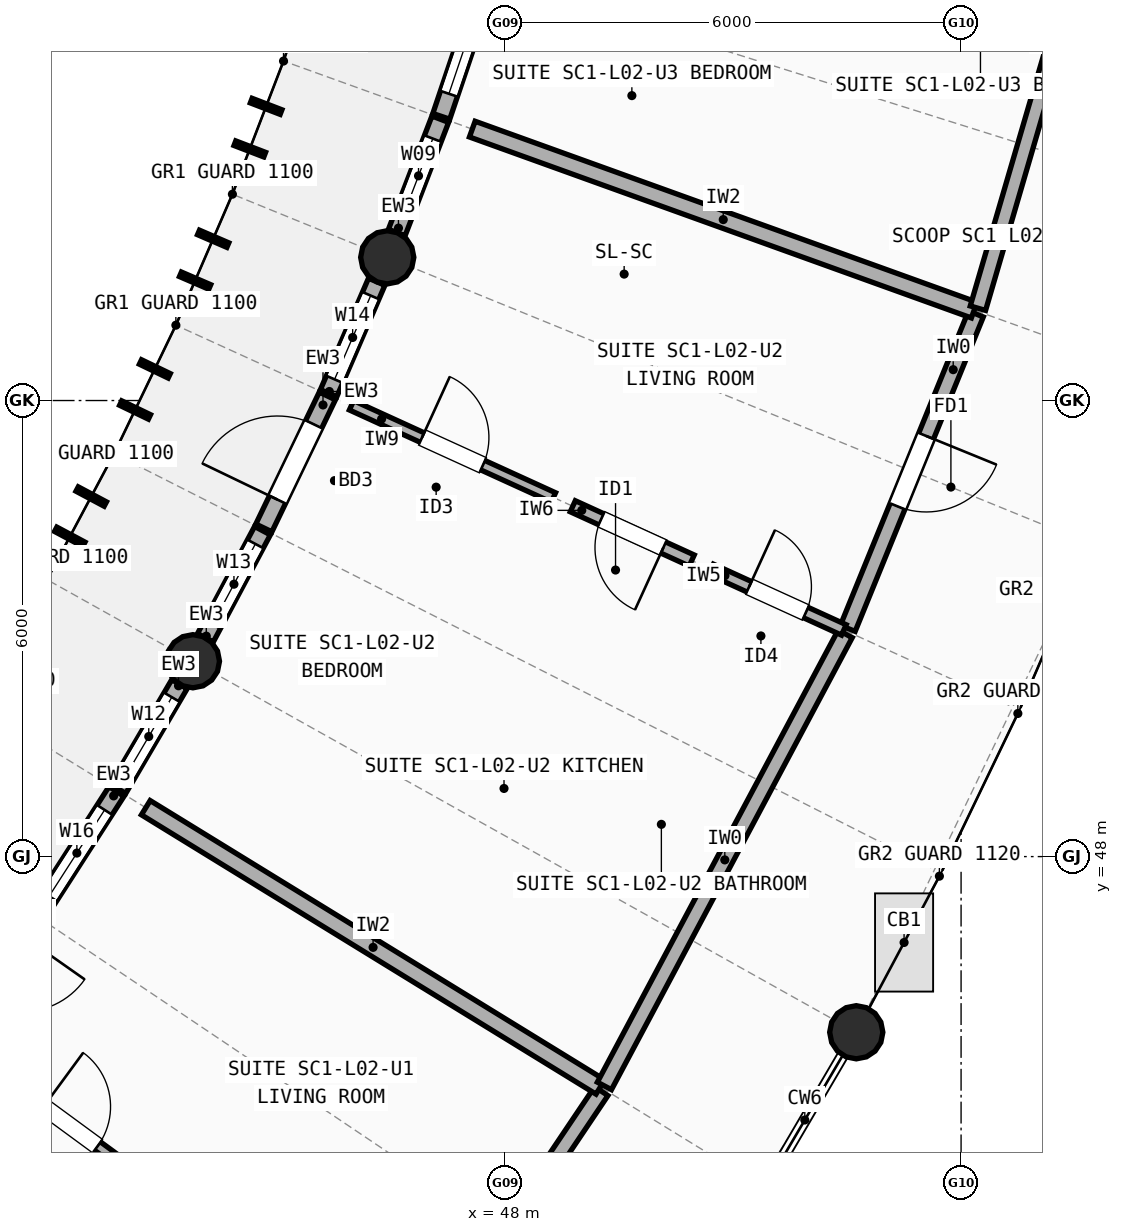
"""IFC4 building model, lengths in metres.
Left out: names, types, materials, properties, quantities, classifications, styles, units other than length and angle.
Written with IfcOpenShell. Run it as: python <this file> out.ifc"""

import sys

from ifc_helpers import new_model, si_unit, direction, frame, frame_2d, origin, origin_2d, place, context, subcontext, project, spatial, rectangle, circle, extrude, element, fill, save


model = new_model("IFC4")
c1 = context("Model", 3, precision=1e-05, world=origin(), true_north=direction((0.0, 1.0)))
c2 = subcontext(c1, "Body", "Model", "MODEL_VIEW")
j1 = project(units=[si_unit("LENGTHUNIT", "METRE"), si_unit("PLANEANGLEUNIT", "RADIAN")], contexts=[c1])
p1 = place(None, origin())
s1 = spatial("IfcSite", under=j1, at=p1, CompositionType="ELEMENT")
p2 = place(p1, origin())
s2 = spatial("IfcBuilding", under=s1, at=p2, CompositionType="ELEMENT")
p3 = place(p2, frame((0.0, 0.0, 7.7)))
s3 = spatial("IfcBuildingStorey", under=s2, at=p3, CompositionType="ELEMENT", Elevation=7.7)
for number, where, z_axis, x_axis in (
    (1, (43.893, 50.57, 0.0), (0.0, 0.0, 1.0), (1.0, 0.0, 0.0)),
    (2, (52.621, 45.689, 0.0), (0.0, 0.0, 1.0), (1.0, 0.0, 0.0)),
    (3, (46.45, 55.884, 0.0), (0.0, 0.0, 1.0), (1.0, 0.0, 0.0)),
):
    element("IfcColumn", number, at=place(p3, frame(where, z_axis=z_axis, x_axis=x_axis)), inside=s3, PredefinedType="COLUMN", context=c2, shape_type="SweptSolid", body=[
        extrude(circle(Radius=0.35, at=origin_2d()), origin(), (0.0, 0.0, 1.0), 2.948),
    ])
p4 = place(p3, frame((41.845, 47.236, 0.0), z_axis=(0.0, 0.0, 1.0), x_axis=(0.540911277163, 0.841079657486, 0.0)))
e4 = element("IfcWall", 4, at=p4, inside=s3, PredefinedType="STANDARD", context=c2, shape_type="SweptSolid", body=[
    extrude(rectangle(XDim=1.927, YDim=0.235, at=frame_2d((0.963, 0.0))), origin(), (0.0, 0.0, 1.0), 2.684),
])
p5 = place(p4, frame((0.288, 0.0, 0.85)))
e5 = element("IfcOpeningElement", 5, at=p5, cuts=e4, PredefinedType="OPENING", context=c2, shape_type="SweptSolid", body=[
    extrude(rectangle(XDim=1.35, YDim=1.5, at=frame_2d((0.675, 0.75))), frame((0.0, 0.127, 0.0), z_axis=(0.0, -1.0, 0.0), x_axis=(1.0, 0.0, 0.0)), (0.0, 0.0, 1.0), 0.255),
])
p6 = place(p3, frame((42.908, 48.891, 0.0), z_axis=(0.0, 0.0, 1.0), x_axis=(0.505970625323, 0.862550709414, 0.0)))
e6 = element("IfcWall", 6, at=p6, inside=s3, PredefinedType="STANDARD", context=c2, shape_type="SweptSolid", body=[
    extrude(rectangle(XDim=1.597, YDim=0.235, at=frame_2d((0.798, 0.0))), origin(), (0.0, 0.0, 1.0), 2.684),
])
p7 = place(p6, frame((0.198, 0.0, 0.85)))
e7 = element("IfcOpeningElement", 7, at=p7, cuts=e6, PredefinedType="OPENING", context=c2, shape_type="SweptSolid", body=[
    extrude(rectangle(XDim=1.2, YDim=1.35, at=frame_2d((0.6, 0.675))), frame((0.0, 0.127, 0.0), z_axis=(0.0, -1.0, 0.0), x_axis=(1.0, 0.0, 0.0)), (0.0, 0.0, 1.0), 0.255),
])
p8 = place(p3, frame((44.058, 50.879, 0.0), z_axis=(0.0, 0.0, 1.0), x_axis=(0.470183436771, 0.882568714484, 0.0)))
e8 = element("IfcWall", 8, at=p8, inside=s3, PredefinedType="STANDARD", context=c2, shape_type="SweptSolid", body=[
    extrude(rectangle(XDim=1.597, YDim=0.235, at=frame_2d((0.798, 0.0))), origin(), (0.0, 0.0, 1.0), 2.684),
])
p9 = place(p8, frame((0.198, 0.0, 0.85)))
e9 = element("IfcOpeningElement", 9, at=p9, cuts=e8, PredefinedType="OPENING", context=c2, shape_type="SweptSolid", body=[
    extrude(rectangle(XDim=1.2, YDim=1.45, at=frame_2d((0.6, 0.725))), frame((0.0, 0.127, 0.0), z_axis=(0.0, -1.0, 0.0), x_axis=(1.0, 0.0, 0.0)), (0.0, 0.0, 1.0), 0.255),
])
p10 = place(p3, frame((44.826, 52.324, 0.0), z_axis=(0.0, 0.0, 1.0), x_axis=(0.433579410465, 0.90111536155, 0.0)))
e10 = element("IfcWall", 10, at=p10, inside=s3, PredefinedType="STANDARD", context=c2, shape_type="SweptSolid", body=[
    extrude(rectangle(XDim=1.927, YDim=0.235, at=frame_2d((0.963, 0.0))), origin(), (0.0, 0.0, 1.0), 2.684),
])
p11 = place(p10, frame((0.413, 0.0, 0.0)))
e11 = element("IfcOpeningElement", 11, at=p11, cuts=e10, PredefinedType="OPENING", context=c2, shape_type="SweptSolid", body=[
    extrude(rectangle(XDim=1.1, YDim=2.15, at=frame_2d((0.55, 1.075))), frame((0.0, 0.127, 0.0), z_axis=(0.0, -1.0, 0.0), x_axis=(1.0, 0.0, 0.0)), (0.0, 0.0, 1.0), 0.255),
])
p12 = place(p3, frame((45.678, 54.097, 0.0), z_axis=(0.0, 0.0, 1.0), x_axis=(0.396353998836, 0.918097765822, 0.0)))
e12 = element("IfcWall", 12, at=p12, inside=s3, PredefinedType="STANDARD", context=c2, shape_type="SweptSolid", body=[
    extrude(rectangle(XDim=1.597, YDim=0.235, at=frame_2d((0.798, 0.0))), origin(), (0.0, 0.0, 1.0), 2.684),
])
p13 = place(p12, frame((0.198, 0.0, 0.85)))
e13 = element("IfcOpeningElement", 13, at=p13, cuts=e12, PredefinedType="OPENING", context=c2, shape_type="SweptSolid", body=[
    extrude(rectangle(XDim=1.2, YDim=1.5, at=frame_2d((0.6, 0.75))), frame((0.0, 0.127, 0.0), z_axis=(0.0, -1.0, 0.0), x_axis=(1.0, 0.0, 0.0)), (0.0, 0.0, 1.0), 0.255),
])
p14 = place(p3, frame((46.575, 56.211, 0.0), z_axis=(0.0, 0.0, 1.0), x_axis=(0.358384767005, 0.933573970705, 0.0)))
e14 = element("IfcWall", 14, at=p14, inside=s3, PredefinedType="STANDARD", context=c2, shape_type="SweptSolid", body=[
    extrude(rectangle(XDim=1.597, YDim=0.235, at=frame_2d((0.798, 0.0))), origin(), (0.0, 0.0, 1.0), 2.684),
])
p15 = place(p14, frame((0.273, 0.0, 0.85)))
e15 = element("IfcOpeningElement", 15, at=p15, cuts=e14, PredefinedType="OPENING", context=c2, shape_type="SweptSolid", body=[
    extrude(rectangle(XDim=1.05, YDim=1.35, at=frame_2d((0.525, 0.675))), frame((0.0, 0.127, 0.0), z_axis=(0.0, -1.0, 0.0), x_axis=(1.0, 0.0, 0.0)), (0.0, 0.0, 1.0), 0.255),
])
p16 = place(p3, frame((47.161, 57.739, 0.0), z_axis=(0.0, 0.0, 1.0), x_axis=(0.319798549746, 0.947485560618, 0.0)))
e16 = element("IfcWall", 16, at=p16, inside=s3, PredefinedType="STANDARD", context=c2, shape_type="SweptSolid", body=[
    extrude(rectangle(XDim=1.927, YDim=0.235, at=frame_2d((0.963, 0.0))), origin(), (0.0, 0.0, 1.0), 2.684),
])
p17 = place(p16, frame((0.313, 0.0, 0.85)))
e17 = element("IfcOpeningElement", 17, at=p17, cuts=e16, PredefinedType="OPENING", context=c2, shape_type="SweptSolid", body=[
    extrude(rectangle(XDim=1.3, YDim=1.45, at=frame_2d((0.65, 0.725))), frame((0.0, 0.127, 0.0), z_axis=(0.0, -1.0, 0.0), x_axis=(1.0, 0.0, 0.0)), (0.0, 0.0, 1.0), 0.255),
])
p18 = place(p3, frame((46.774, 41.207, 0.0), z_axis=(0.0, 0.0, 1.0), x_axis=(0.55793724224, 0.829883144619, 0.0)))
e18 = element("IfcWall", 18, at=p18, inside=s3, PredefinedType="SOLIDWALL", context=c2, shape_type="SweptSolid", body=[
    extrude(rectangle(XDim=4.467, YDim=0.21, at=frame_2d((2.234, 0.0))), origin(), (0.0, 0.0, 1.0), 2.762),
])
p19 = place(p18, frame((1.708, 0.0, 0.0)))
e19 = element("IfcOpeningElement", 19, at=p19, cuts=e18, PredefinedType="OPENING", context=c2, shape_type="SweptSolid", body=[
    extrude(rectangle(XDim=1.05, YDim=2.15, at=frame_2d((0.525, 1.075))), frame((0.0, 0.115, 0.0), z_axis=(0.0, -1.0, 0.0), x_axis=(1.0, 0.0, 0.0)), (0.0, 0.0, 1.0), 0.23),
])
p20 = place(p3, frame((41.236, 45.219, 0.0), z_axis=(0.0, 0.0, 1.0), x_axis=(0.806321400299, -0.591477640676, 0.0)))
e20 = element("IfcWall", 20, at=p20, inside=s3, PredefinedType="PARTITIONING", context=c2, shape_type="SweptSolid", body=[
    extrude(rectangle(XDim=2.6, YDim=0.135, at=frame_2d((1.3, 0.0))), origin(), (0.0, 0.0, 1.0), 2.742),
])
p21 = place(p20, frame((0.86, 0.0, 0.0)))
e21 = element("IfcOpeningElement", 21, at=p21, cuts=e20, PredefinedType="OPENING", context=c2, shape_type="SweptSolid", body=[
    extrude(rectangle(XDim=0.88, YDim=2.1, at=frame_2d((0.44, 1.05))), frame((0.0, 0.077, 0.0), z_axis=(0.0, -1.0, 0.0), x_axis=(1.0, 0.0, 0.0)), (0.0, 0.0, 1.0), 0.155),
])
p22 = place(p3, frame((43.273, 48.643, 0.0), z_axis=(0.0, 0.0, 1.0), x_axis=(0.852035433886, -0.523484115713, 0.0)))
e22 = element("IfcWall", 22, at=p22, inside=s3, PredefinedType="SOLIDWALL", context=c2, shape_type="SweptSolid", body=[
    extrude(rectangle(XDim=7.02, YDim=0.22, at=frame_2d((3.51, 0.0))), origin(), (0.0, 0.0, 1.0), 2.722),
])
p23 = place(p3, frame((49.307, 44.983, 0.0), z_axis=(0.0, 0.0, 1.0), x_axis=(0.47013685006, 0.88259353171, 0.0)))
e23 = element("IfcWall", 23, at=p23, inside=s3, PredefinedType="SOLIDWALL", context=c2, shape_type="SweptSolid", body=[
    extrude(rectangle(XDim=6.738, YDim=0.21, at=frame_2d((3.369, 0.0))), origin(), (0.0, 0.0, 1.0), 2.742),
])
p24 = place(p3, frame((52.509, 51.002, 0.0), z_axis=(0.0, 0.0, 1.0), x_axis=(0.377413192487, 0.926044967665, 0.0)))
e24 = element("IfcWall", 24, at=p24, inside=s3, PredefinedType="SOLIDWALL", context=c2, shape_type="SweptSolid", body=[
    extrude(rectangle(XDim=4.467, YDim=0.21, at=frame_2d((2.234, 0.0))), origin(), (0.0, 0.0, 1.0), 2.742),
])
p25 = place(p24, frame((1.734, 0.0, 0.0)))
e25 = element("IfcOpeningElement", 25, at=p25, cuts=e24, PredefinedType="OPENING", context=c2, shape_type="SweptSolid", body=[
    extrude(rectangle(XDim=1.0, YDim=2.15, at=frame_2d((0.5, 1.075))), frame((0.0, 0.115, 0.0), z_axis=(0.0, -1.0, 0.0), x_axis=(1.0, 0.0, 0.0)), (0.0, 0.0, 1.0), 0.23),
])
p26 = place(p3, frame((45.98, 53.937, 0.0), z_axis=(0.0, 0.0, 1.0), x_axis=(0.909795784273, -0.415056178029, 0.0)))
e26 = element("IfcWall", 26, at=p26, inside=s3, PredefinedType="PARTITIONING", context=c2, shape_type="SweptSolid", body=[
    extrude(rectangle(XDim=2.92, YDim=0.135, at=frame_2d((1.46, 0.0))), origin(), (0.0, 0.0, 1.0), 2.722),
])
p27 = place(p26, frame((1.02, 0.0, 0.0)))
e27 = element("IfcOpeningElement", 27, at=p27, cuts=e26, PredefinedType="OPENING", context=c2, shape_type="SweptSolid", body=[
    extrude(rectangle(XDim=0.88, YDim=2.1, at=frame_2d((0.44, 1.05))), frame((0.0, 0.077, 0.0), z_axis=(0.0, -1.0, 0.0), x_axis=(1.0, 0.0, 0.0)), (0.0, 0.0, 1.0), 0.155),
])
p28 = place(p3, frame((48.891, 52.609, 0.0), z_axis=(0.0, 0.0, 1.0), x_axis=(0.909787074161, -0.415075269909, 0.0)))
e28 = element("IfcWall", 28, at=p28, inside=s3, PredefinedType="PLUMBINGWALL", context=c2, shape_type="SweptSolid", body=[
    extrude(rectangle(XDim=1.72, YDim=0.16, at=frame_2d((0.86, 0.0))), origin(), (0.0, 0.0, 1.0), 2.722),
])
p29 = place(p28, frame((0.41, 0.0, 0.0)))
e29 = element("IfcOpeningElement", 29, at=p29, cuts=e28, PredefinedType="OPENING", context=c2, shape_type="SweptSolid", body=[
    extrude(rectangle(XDim=0.9, YDim=2.1, at=frame_2d((0.45, 1.05))), frame((0.0, 0.09, 0.0), z_axis=(0.0, -1.0, 0.0), x_axis=(1.0, 0.0, 0.0)), (0.0, 0.0, 1.0), 0.18),
])
p30 = place(p3, frame((50.711, 51.779, 0.0), z_axis=(0.0, 0.0, 1.0), x_axis=(0.90980388611, -0.415038418485, 0.0)))
e30 = element("IfcWall", 30, at=p30, inside=s3, PredefinedType="PARTITIONING", context=c2, shape_type="SweptSolid", body=[
    extrude(rectangle(XDim=1.92, YDim=0.15, at=frame_2d((0.96, 0.0))), origin(), (0.0, 0.0, 1.0), 2.722),
])
p31 = place(p30, frame((0.55, 0.0, 0.0)))
e31 = element("IfcOpeningElement", 31, at=p31, cuts=e30, PredefinedType="OPENING", context=c2, shape_type="SweptSolid", body=[
    extrude(rectangle(XDim=0.82, YDim=2.08, at=frame_2d((0.41, 1.04))), frame((0.0, 0.085, 0.0), z_axis=(0.0, -1.0, 0.0), x_axis=(1.0, 0.0, 0.0)), (0.0, 0.0, 1.0), 0.17),
])
p32 = place(p3, frame((47.569, 57.571, 0.0), z_axis=(0.0, 0.0, 1.0), x_axis=(0.940728143869, -0.339161553441, 0.0)))
e32 = element("IfcWall", 32, at=p32, inside=s3, PredefinedType="SOLIDWALL", context=c2, shape_type="SweptSolid", body=[
    extrude(rectangle(XDim=7.02, YDim=0.22, at=frame_2d((3.51, 0.0))), origin(), (0.0, 0.0, 1.0), 2.762),
])
p33 = place(p3, frame((54.221, 55.215, 0.0), z_axis=(0.0, 0.0, 1.0), x_axis=(0.280749798049, 0.95978099111, 0.0)))
e33 = element("IfcWall", 33, at=p33, inside=s3, PredefinedType="SOLIDWALL", context=c2, shape_type="SweptSolid", body=[
    extrude(rectangle(XDim=6.739, YDim=0.21, at=frame_2d((3.369, 0.0))), origin(), (0.0, 0.0, 1.0), 2.722),
])
p34 = place(p5, origin())
e34 = element("IfcWindow", 34, at=p34, inside=s3, PartitioningType="SINGLE_PANEL", PredefinedType="WINDOW", context=c2, shape_type="SweptSolid", body=[
    extrude(rectangle(XDim=1.35, YDim=1.5, at=frame_2d((0.675, 0.75))), frame((0.0, 0.03, 0.0), z_axis=(0.0, -1.0, 0.0), x_axis=(1.0, 0.0, 0.0)), (0.0, 0.0, 1.0), 0.06),
])
fill(e5, e34)
p35 = place(p7, origin())
e35 = element("IfcWindow", 35, at=p35, inside=s3, PartitioningType="SINGLE_PANEL", PredefinedType="WINDOW", context=c2, shape_type="SweptSolid", body=[
    extrude(rectangle(XDim=1.2, YDim=1.35, at=frame_2d((0.6, 0.675))), frame((0.0, 0.03, 0.0), z_axis=(0.0, -1.0, 0.0), x_axis=(1.0, 0.0, 0.0)), (0.0, 0.0, 1.0), 0.06),
])
fill(e7, e35)
p36 = place(p9, origin())
e36 = element("IfcWindow", 36, at=p36, inside=s3, PartitioningType="SINGLE_PANEL", PredefinedType="WINDOW", context=c2, shape_type="SweptSolid", body=[
    extrude(rectangle(XDim=1.2, YDim=1.45, at=frame_2d((0.6, 0.725))), frame((0.0, 0.03, 0.0), z_axis=(0.0, -1.0, 0.0), x_axis=(1.0, 0.0, 0.0)), (0.0, 0.0, 1.0), 0.06),
])
fill(e9, e36)
p37 = place(p11, origin())
e37 = element("IfcDoor", 37, at=p37, inside=s3, OperationType="SINGLE_SWING_LEFT", PredefinedType="DOOR", context=c2, shape_type="SweptSolid", body=[
    extrude(rectangle(XDim=1.1, YDim=2.15, at=frame_2d((0.55, 1.075))), frame((0.0, 0.025, 0.0), z_axis=(0.0, -1.0, 0.0), x_axis=(1.0, 0.0, 0.0)), (0.0, 0.0, 1.0), 0.05),
])
fill(e11, e37)
p38 = place(p13, origin())
e38 = element("IfcWindow", 38, at=p38, inside=s3, PartitioningType="SINGLE_PANEL", PredefinedType="WINDOW", context=c2, shape_type="SweptSolid", body=[
    extrude(rectangle(XDim=1.2, YDim=1.5, at=frame_2d((0.6, 0.75))), frame((0.0, 0.03, 0.0), z_axis=(0.0, -1.0, 0.0), x_axis=(1.0, 0.0, 0.0)), (0.0, 0.0, 1.0), 0.06),
])
fill(e13, e38)
p39 = place(p15, origin())
e39 = element("IfcWindow", 39, at=p39, inside=s3, PartitioningType="SINGLE_PANEL", PredefinedType="WINDOW", context=c2, shape_type="SweptSolid", body=[
    extrude(rectangle(XDim=1.05, YDim=1.35, at=frame_2d((0.525, 0.675))), frame((0.0, 0.03, 0.0), z_axis=(0.0, -1.0, 0.0), x_axis=(1.0, 0.0, 0.0)), (0.0, 0.0, 1.0), 0.06),
])
fill(e15, e39)
p40 = place(p17, origin())
e40 = element("IfcWindow", 40, at=p40, inside=s3, PartitioningType="SINGLE_PANEL", PredefinedType="WINDOW", context=c2, shape_type="SweptSolid", body=[
    extrude(rectangle(XDim=1.3, YDim=1.45, at=frame_2d((0.65, 0.725))), frame((0.0, 0.03, 0.0), z_axis=(0.0, -1.0, 0.0), x_axis=(1.0, 0.0, 0.0)), (0.0, 0.0, 1.0), 0.06),
])
fill(e17, e40)
p41 = place(p21, origin())
e41 = element("IfcDoor", 41, at=p41, inside=s3, OperationType="SINGLE_SWING_LEFT", PredefinedType="DOOR", context=c2, shape_type="SweptSolid", body=[
    extrude(rectangle(XDim=0.88, YDim=2.1, at=frame_2d((0.44, 1.05))), frame((0.0, 0.025, 0.0), z_axis=(0.0, -1.0, 0.0), x_axis=(1.0, 0.0, 0.0)), (0.0, 0.0, 1.0), 0.05),
])
fill(e21, e41)
p42 = place(p25, origin())
e42 = element("IfcDoor", 42, at=p42, inside=s3, OperationType="SINGLE_SWING_RIGHT", PredefinedType="DOOR", context=c2, shape_type="SweptSolid", body=[
    extrude(rectangle(XDim=1.0, YDim=2.15, at=frame_2d((0.5, 1.075))), frame((0.0, 0.025, 0.0), z_axis=(0.0, -1.0, 0.0), x_axis=(1.0, 0.0, 0.0)), (0.0, 0.0, 1.0), 0.05),
])
fill(e25, e42)
p43 = place(p27, origin())
e43 = element("IfcDoor", 43, at=p43, inside=s3, OperationType="SINGLE_SWING_LEFT", PredefinedType="DOOR", context=c2, shape_type="SweptSolid", body=[
    extrude(rectangle(XDim=0.88, YDim=2.1, at=frame_2d((0.44, 1.05))), frame((0.0, 0.025, 0.0), z_axis=(0.0, -1.0, 0.0), x_axis=(1.0, 0.0, 0.0)), (0.0, 0.0, 1.0), 0.05),
])
fill(e27, e43)
p44 = place(p29, origin())
e44 = element("IfcDoor", 44, at=p44, inside=s3, OperationType="SINGLE_SWING_RIGHT", PredefinedType="DOOR", context=c2, shape_type="SweptSolid", body=[
    extrude(rectangle(XDim=0.9, YDim=2.1, at=frame_2d((0.45, 1.05))), frame((0.0, 0.025, 0.0), z_axis=(0.0, -1.0, 0.0), x_axis=(1.0, 0.0, 0.0)), (0.0, 0.0, 1.0), 0.05),
])
fill(e29, e44)
p45 = place(p31, origin())
e45 = element("IfcDoor", 45, at=p45, inside=s3, OperationType="SINGLE_SWING_LEFT", PredefinedType="DOOR", context=c2, shape_type="SweptSolid", body=[
    extrude(rectangle(XDim=0.82, YDim=2.08, at=frame_2d((0.41, 1.04))), frame((0.0, 0.025, 0.0), z_axis=(0.0, -1.0, 0.0), x_axis=(1.0, 0.0, 0.0)), (0.0, 0.0, 1.0), 0.05),
])
fill(e31, e45)
save(model, sys.argv[1])
